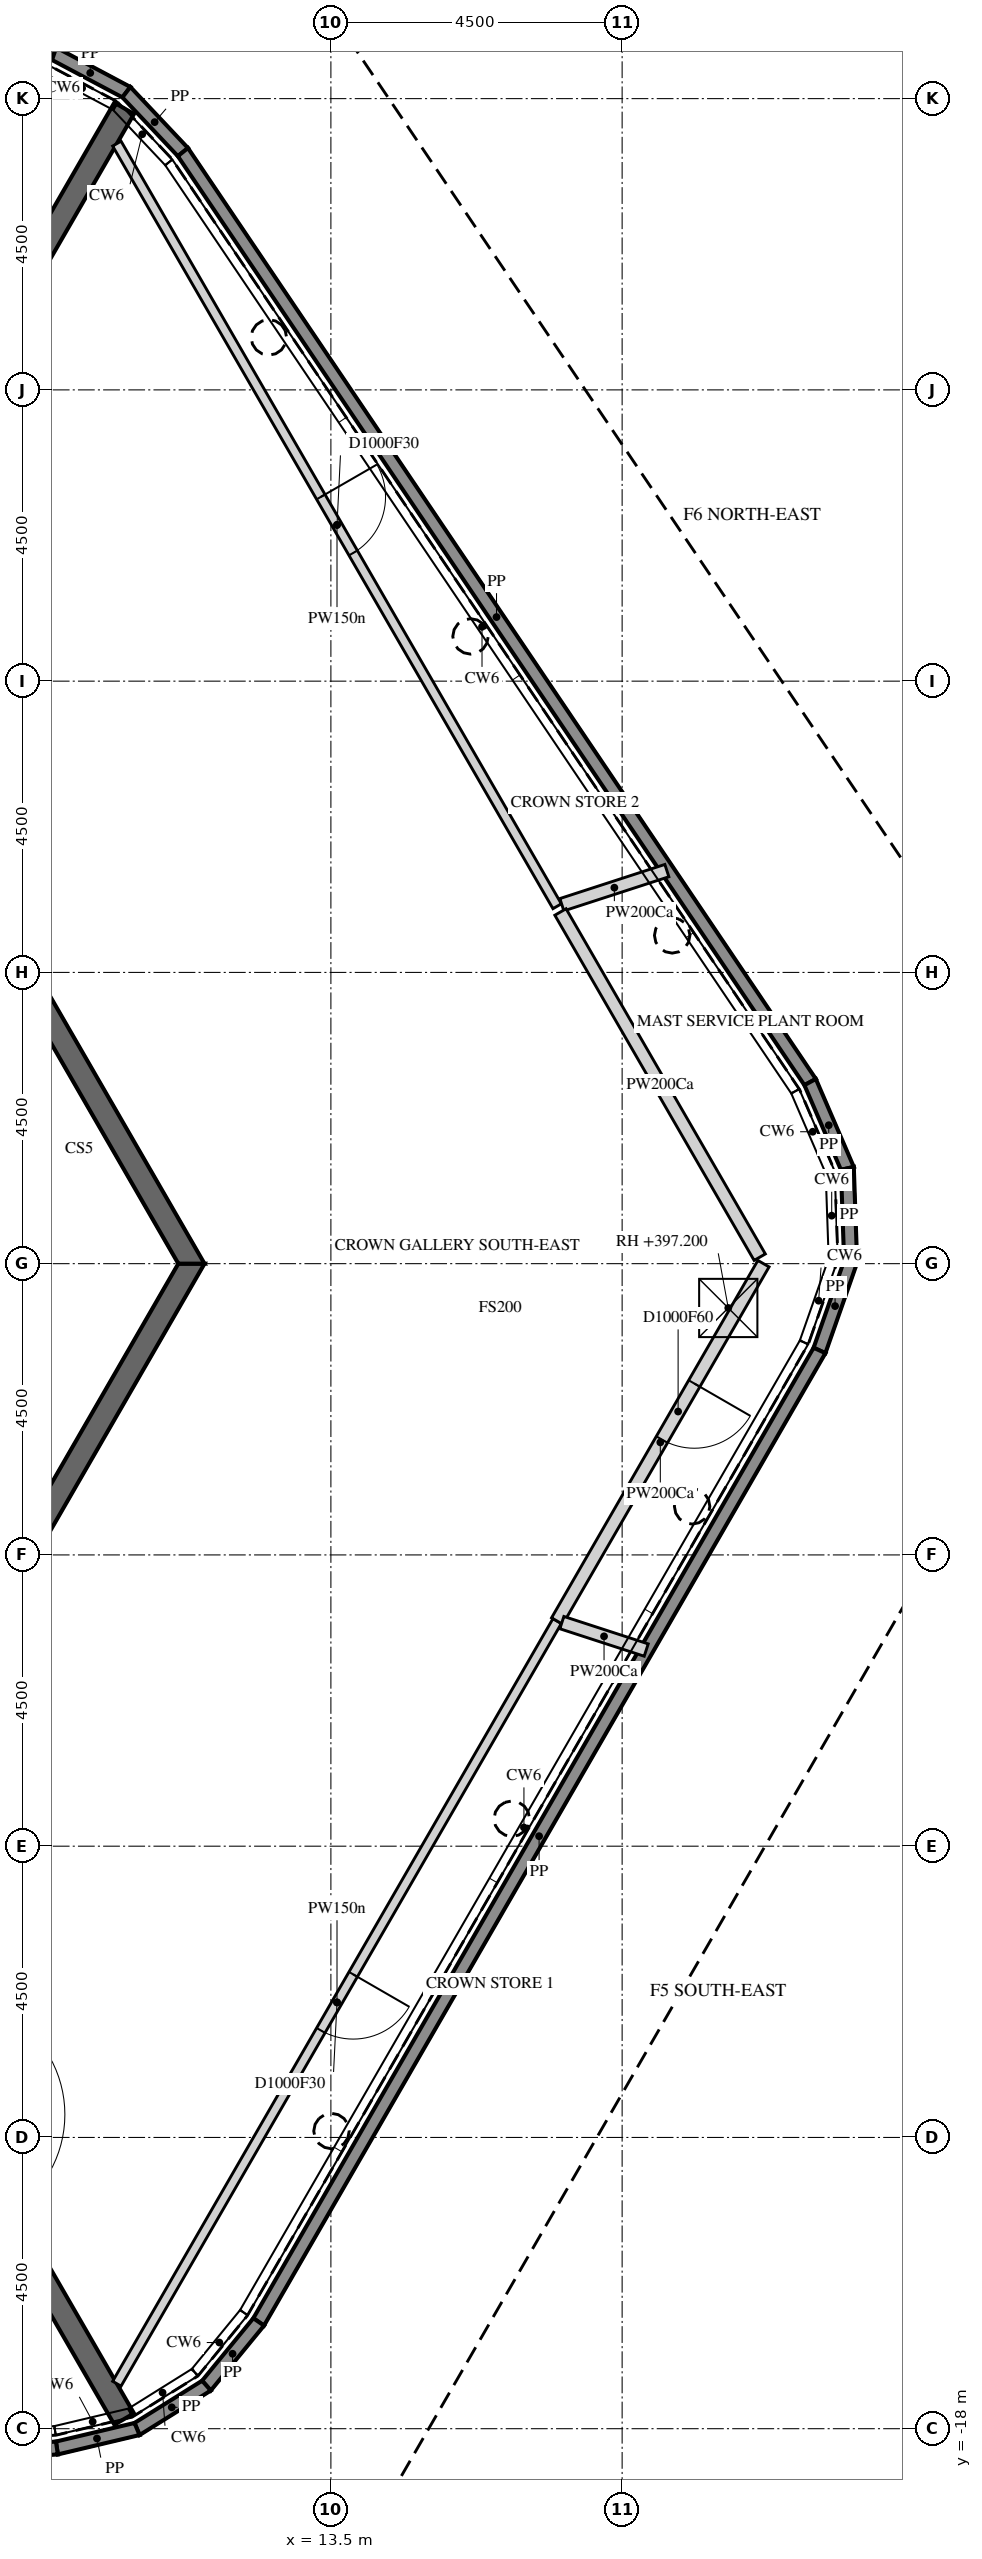
"""IFC4 building model, lengths in metres.
Left out: names, types, materials, properties, quantities, classifications, styles, units other than length and angle.
Written with IfcOpenShell. Run it as: python <this file> out.ifc"""

import sys

from ifc_helpers import new_model, si_unit, direction, frame, frame_2d, origin, origin_2d, place, context, subcontext, project, spatial, polyline, rectangle, outline, extrude, element, fill, save


model = new_model("IFC4")
c1 = context("Model", 3, precision=1e-05, world=origin(), true_north=direction((0.0, 1.0)))
c2 = subcontext(c1, "Body", "Model", "MODEL_VIEW")
j1 = project(units=[si_unit("LENGTHUNIT", "METRE"), si_unit("PLANEANGLEUNIT", "RADIAN")], contexts=[c1])
p1 = place(None, origin())
s1 = spatial("IfcSite", under=j1, at=p1, CompositionType="ELEMENT")
p2 = place(p1, origin())
s2 = spatial("IfcBuilding", under=s1, at=p2, CompositionType="ELEMENT")
p3 = place(p2, frame((0.0, 0.0, 392.7)))
s3 = spatial("IfcBuildingStorey", under=s2, at=p3, CompositionType="ELEMENT", Elevation=392.7)
p4 = place(p3, frame((7.968, 18.9, 4.5), z_axis=(0.0, 0.0, 1.0), x_axis=(0.9867748983, -0.162096576412, 0.0)))
e1 = element("IfcWall", 1, at=p4, inside=s3, PredefinedType="PARAPET", context=c2, shape_type="SweptSolid", body=[
    extrude(outline(polyline([(0.008, -0.1), (1.256, -0.1), (1.289, 0.1), (-0.008, 0.1), (0.008, -0.1)])), origin(), (0.0, 0.0, 1.0), 1.1),
])
p5 = place(p3, frame((9.223, 18.694, 4.5), z_axis=(0.0, 0.0, 1.0), x_axis=(0.882950708751, -0.469465702598, 0.0)))
e2 = element("IfcWall", 2, at=p5, inside=s3, PredefinedType="PARAPET", context=c2, shape_type="SweptSolid", body=[
    extrude(outline(polyline([(0.016, -0.1), (1.248, -0.1), (1.281, 0.1), (-0.016, 0.1), (0.016, -0.1)])), origin(), (0.0, 0.0, 1.0), 1.1),
])
p6 = place(p3, frame((10.34, 18.1, 4.5), z_axis=(0.0, 0.0, 1.0), x_axis=(0.686184039693, -0.727427978339, 0.0)))
e3 = element("IfcWall", 3, at=p6, inside=s3, PredefinedType="PARAPET", context=c2, shape_type="SweptSolid", body=[
    extrude(outline(polyline([(0.016, -0.1), (1.265, -0.1), (1.281, 0.1), (-0.016, 0.1), (0.016, -0.1)])), origin(), (0.0, 0.0, 1.0), 1.1),
])
p7 = place(p3, frame((11.213, 17.174, 4.5), z_axis=(0.0, 0.0, 1.0), x_axis=(0.559200888718, -0.829032186382, 0.0)))
e4 = element("IfcWall", 4, at=p7, inside=s3, PredefinedType="PARAPET", context=c2, shape_type="SweptSolid", body=[
    extrude(outline(polyline([(0.008, -0.1), (17.322, -0.1), (17.341, 0.1), (-0.008, 0.1), (0.008, -0.1)])), origin(), (0.0, 0.0, 1.0), 1.1),
])
p8 = place(p3, frame((20.905, 2.806, 4.5), z_axis=(0.0, 0.0, 1.0), x_axis=(0.396007748468, -0.918247168879, 0.0)))
e5 = element("IfcWall", 5, at=p8, inside=s3, PredefinedType="PARAPET", context=c2, shape_type="SweptSolid", body=[
    extrude(outline(polyline([(0.009, -0.1), (1.434, -0.1), (1.471, 0.1), (-0.009, 0.1), (0.009, -0.1)])), origin(), (0.0, 0.0, 1.0), 1.1),
])
p9 = place(p3, frame((21.48, 1.472, 4.5), z_axis=(0.0, 0.0, 1.0), x_axis=(0.034846799115, -0.999392665868, 0.0)))
e6 = element("IfcWall", 6, at=p9, inside=s3, PredefinedType="PARAPET", context=c2, shape_type="SweptSolid", body=[
    extrude(outline(polyline([(0.019, -0.1), (1.425, -0.1), (1.462, 0.1), (-0.019, 0.1), (0.019, -0.1)])), origin(), (0.0, 0.0, 1.0), 1.1),
])
p10 = place(p3, frame((21.531, 0.03, 4.5), z_axis=(0.0, 0.0, 1.0), x_axis=(-0.330964304762, -0.943643274216, 0.0)))
e7 = element("IfcWall", 7, at=p10, inside=s3, PredefinedType="PARAPET", context=c2, shape_type="SweptSolid", body=[
    extrude(outline(polyline([(0.019, -0.1), (1.443, -0.1), (1.462, 0.1), (-0.019, 0.1), (0.019, -0.1)])), origin(), (0.0, 0.0, 1.0), 1.1),
])
p11 = place(p3, frame((21.05, -1.341, 4.5), z_axis=(0.0, 0.0, 1.0), x_axis=(-0.500006974487, -0.866021377025, 0.0)))
e8 = element("IfcWall", 8, at=p11, inside=s3, PredefinedType="PARAPET", context=c2, shape_type="SweptSolid", body=[
    extrude(outline(polyline([(0.009, -0.1), (17.323, -0.1), (17.339, 0.1), (-0.009, 0.1), (0.009, -0.1)])), origin(), (0.0, 0.0, 1.0), 1.1),
])
p12 = place(p3, frame((12.384, -16.35, 4.5), z_axis=(0.0, 0.0, 1.0), x_axis=(-0.633822610937, -0.773478440466, 0.0)))
e9 = element("IfcWall", 9, at=p12, inside=s3, PredefinedType="PARAPET", context=c2, shape_type="SweptSolid", body=[
    extrude(outline(polyline([(0.008, -0.1), (1.256, -0.1), (1.289, 0.1), (-0.008, 0.1), (0.008, -0.1)])), origin(), (0.0, 0.0, 1.0), 1.1),
])
p13 = place(p3, frame((11.577, -17.334, 4.5), z_axis=(0.0, 0.0, 1.0), x_axis=(-0.848052526064, -0.529912174834, 0.0)))
e10 = element("IfcWall", 10, at=p13, inside=s3, PredefinedType="PARAPET", context=c2, shape_type="SweptSolid", body=[
    extrude(outline(polyline([(0.016, -0.1), (1.248, -0.1), (1.281, 0.1), (-0.016, 0.1), (0.016, -0.1)])), origin(), (0.0, 0.0, 1.0), 1.1),
])
p14 = place(p3, frame((10.505, -18.005, 4.5), z_axis=(0.0, 0.0, 1.0), x_axis=(-0.97305877523, -0.230557194525, 0.0)))
e11 = element("IfcWall", 11, at=p14, inside=s3, PredefinedType="PARAPET", context=c2, shape_type="SweptSolid", body=[
    extrude(outline(polyline([(0.016, -0.1), (1.265, -0.1), (1.281, 0.1), (-0.016, 0.1), (0.016, -0.1)])), origin(), (0.0, 0.0, 1.0), 1.1),
])
p15 = place(p3, frame((9.266, -18.298, 4.5), z_axis=(0.0, 0.0, 1.0), x_axis=(-0.997563920068, -0.069758335553, 0.0)))
e12 = element("IfcWall", 12, at=p15, inside=s3, PredefinedType="PARAPET", context=c2, shape_type="SweptSolid", body=[
    extrude(outline(polyline([(0.008, -0.1), (17.322, -0.1), (17.34, 0.1), (-0.008, 0.1), (0.008, -0.1)])), origin(), (0.0, 0.0, 1.0), 1.1),
])
p16 = place(p3, frame((5.673, -9.825, -0.2), z_axis=(0.0, 0.0, 1.0), x_axis=(0.499995046907, 0.866028263435, 0.0)))
e13 = element("IfcWall", 13, at=p16, inside=s3, PredefinedType="SHEAR", context=c2, shape_type="SweptSolid", body=[
    extrude(outline(polyline([(-0.101, -0.175), (11.446, -0.175), (11.244, 0.175), (0.101, 0.175), (-0.101, -0.175)])), origin(), (0.0, 0.0, 1.0), 4.5),
])
p17 = place(p16, frame((4.801, 0.0, 0.2)))
e14 = element("IfcOpeningElement", 14, at=p17, cuts=e13, PredefinedType="OPENING", context=c2, shape_type="SweptSolid", body=[
    extrude(rectangle(XDim=1.8, YDim=2.4, at=frame_2d((0.9, 1.2))), frame((0.0, 0.185, 0.0), z_axis=(0.0, -1.0, 0.0), x_axis=(1.0, 0.0, 0.0)), (0.0, 0.0, 1.0), 0.37),
])
p18 = place(p3, frame((11.345, 0.0, -0.2), z_axis=(0.0, 0.0, 1.0), x_axis=(-0.499995046907, 0.866028263435, 0.0)))
e15 = element("IfcWall", 15, at=p18, inside=s3, PredefinedType="SHEAR", context=c2, shape_type="SweptSolid", body=[
    extrude(outline(polyline([(-0.101, -0.175), (11.446, -0.175), (11.244, 0.175), (0.101, 0.175), (-0.101, -0.175)])), origin(), (0.0, 0.0, 1.0), 4.5),
])
p19 = place(p18, frame((4.744, 0.0, 0.2)))
e16 = element("IfcOpeningElement", 16, at=p19, cuts=e15, PredefinedType="OPENING", context=c2, shape_type="SweptSolid", body=[
    extrude(rectangle(XDim=1.8, YDim=2.4, at=frame_2d((0.9, 1.2))), frame((0.0, 0.185, 0.0), z_axis=(0.0, -1.0, 0.0), x_axis=(1.0, 0.0, 0.0)), (0.0, 0.0, 1.0), 0.37),
])
p20 = place(p3, frame((5.773, 10.0, -0.2), z_axis=(0.0, 0.0, 1.0), x_axis=(0.500006102154, 0.866021880676, 0.0)))
e17 = element("IfcWall", 17, at=p20, inside=s3, PredefinedType="SHEAR", context=c2, shape_type="SweptSolid", body=[
    extrude(rectangle(XDim=9.065, YDim=0.35, at=frame_2d((4.532, 0.0))), origin(), (0.0, 0.0, 1.0), 4.5),
])
p21 = place(p20, frame((3.632, 0.0, 0.2)))
e18 = element("IfcOpeningElement", 18, at=p21, cuts=e17, PredefinedType="OPENING", context=c2, shape_type="SweptSolid", body=[
    extrude(rectangle(XDim=1.8, YDim=2.4, at=frame_2d((0.9, 1.2))), frame((0.0, 0.185, 0.0), z_axis=(0.0, -1.0, 0.0), x_axis=(1.0, 0.0, 0.0)), (0.0, 0.0, 1.0), 0.37),
])
p22 = place(p3, frame((5.773, -10.0, -0.2), z_axis=(0.0, 0.0, 1.0), x_axis=(0.500006102154, -0.866021880676, 0.0)))
e19 = element("IfcWall", 19, at=p22, inside=s3, PredefinedType="SHEAR", context=c2, shape_type="SweptSolid", body=[
    extrude(rectangle(XDim=9.065, YDim=0.35, at=frame_2d((4.532, 0.0))), origin(), (0.0, 0.0, 1.0), 4.5),
])
p23 = place(p22, frame((3.632, 0.0, 0.2)))
e20 = element("IfcOpeningElement", 20, at=p23, cuts=e19, PredefinedType="OPENING", context=c2, shape_type="SweptSolid", body=[
    extrude(rectangle(XDim=1.8, YDim=2.4, at=frame_2d((0.9, 1.2))), frame((0.0, 0.185, 0.0), z_axis=(0.0, -1.0, 0.0), x_axis=(1.0, 0.0, 0.0)), (0.0, 0.0, 1.0), 0.37),
])
p24 = place(p3, frame((16.996, -5.522, 0.0), z_axis=(0.0, 0.0, 1.0), x_axis=(-0.500004628935, -0.866022731251, 0.0)))
e21 = element("IfcWall", 21, at=p24, inside=s3, PredefinedType="PARTITIONING", context=c2, shape_type="SweptSolid", body=[
    extrude(rectangle(XDim=13.606, YDim=0.15, at=frame_2d((6.803, 0.0))), origin(), (0.0, 0.0, 1.0), 4.3),
])
p25 = place(p24, frame((6.303, 0.0, 0.0)))
e22 = element("IfcOpeningElement", 22, at=p25, cuts=e21, PredefinedType="OPENING", context=c2, shape_type="SweptSolid", body=[
    extrude(rectangle(XDim=1.0, YDim=2.1, at=frame_2d((0.5, 1.05))), frame((0.0, 0.085, 0.0), z_axis=(0.0, -1.0, 0.0), x_axis=(1.0, 0.0, 0.0)), (0.0, 0.0, 1.0), 0.17),
])
p26 = place(p3, frame((20.184, 0.0, 0.0), z_axis=(0.0, 0.0, 1.0), x_axis=(-0.49998540044, -0.866033832681, 0.0)))
e23 = element("IfcWall", 23, at=p26, inside=s3, PredefinedType="PARTITIONING", context=c2, shape_type="SweptSolid", body=[
    extrude(rectangle(XDim=6.376, YDim=0.2, at=frame_2d((3.188, 0.0))), origin(), (0.0, 0.0, 1.0), 4.3),
])
p27 = place(p26, frame((2.138, 0.0, 0.0)))
e24 = element("IfcOpeningElement", 24, at=p27, cuts=e23, PredefinedType="OPENING", context=c2, shape_type="SweptSolid", body=[
    extrude(rectangle(XDim=1.0, YDim=2.1, at=frame_2d((0.5, 1.05))), frame((0.0, 0.11, 0.0), z_axis=(0.0, -1.0, 0.0), x_axis=(1.0, 0.0, 0.0)), (0.0, 0.0, 1.0), 0.22),
])
p28 = place(p3, frame((10.193, 17.305, 0.0), z_axis=(0.0, 0.0, 1.0), x_axis=(0.500004628935, -0.866022731251, 0.0)))
e25 = element("IfcWall", 25, at=p28, inside=s3, PredefinedType="PARTITIONING", context=c2, shape_type="SweptSolid", body=[
    extrude(rectangle(XDim=13.606, YDim=0.15, at=frame_2d((6.803, 0.0))), origin(), (0.0, 0.0, 1.0), 4.3),
])
p29 = place(p28, frame((6.303, 0.0, 0.0)))
e26 = element("IfcOpeningElement", 26, at=p29, cuts=e25, PredefinedType="OPENING", context=c2, shape_type="SweptSolid", body=[
    extrude(rectangle(XDim=1.0, YDim=2.1, at=frame_2d((0.5, 1.05))), frame((0.0, 0.085, 0.0), z_axis=(0.0, -1.0, 0.0), x_axis=(1.0, 0.0, 0.0)), (0.0, 0.0, 1.0), 0.17),
])
p30 = place(p3, frame((18.372, -5.97, 0.0), z_axis=(0.0, 0.0, 1.0), x_axis=(-0.950868992485, 0.30959353858, 0.0)))
e27 = element("IfcWall", 27, at=p30, inside=s3, PredefinedType="PARTITIONING", context=c2, shape_type="SweptSolid", body=[
    extrude(rectangle(XDim=1.371, YDim=0.2, at=frame_2d((0.685, 0.0))), origin(), (0.0, 0.0, 1.0), 4.3),
])
p31 = place(p3, frame((18.691, 6.073, 0.0), z_axis=(0.0, 0.0, 1.0), x_axis=(-0.951060360014, -0.309005164375, 0.0)))
e28 = element("IfcWall", 28, at=p31, inside=s3, PredefinedType="PARTITIONING", context=c2, shape_type="SweptSolid", body=[
    extrude(rectangle(XDim=1.706, YDim=0.2, at=frame_2d((0.853, 0.0))), origin(), (0.0, 0.0, 1.0), 4.3),
])
p32 = place(p3, frame((20.126, 0.1, 0.0), z_axis=(0.0, 0.0, 1.0), x_axis=(-0.499993558869, 0.866029122541, 0.0)))
e29 = element("IfcWall", 29, at=p32, inside=s3, PredefinedType="PARTITIONING", context=c2, shape_type="SweptSolid", body=[
    extrude(rectangle(XDim=6.158, YDim=0.2, at=frame_2d((3.079, 0.0))), origin(), (0.0, 0.0, 1.0), 4.3),
])
p33 = place(p2, frame((0.0, 0.0, 397.2)))
p34 = place(p33, frame((0.0, 0.0, -0.2)))
p35 = place(p34, frame((19.64, -0.685, 0.0)))
p36 = place(p35, frame((0.0, 0.0, 0.15)))
e30 = element("IfcDoor", 30, at=p36, inside=s3, OperationType="SINGLE_SWING_LEFT", PredefinedType="TRAPDOOR", context=c2, shape_type="SweptSolid", body=[
    extrude(rectangle(XDim=0.9, YDim=0.9, at=origin_2d()), origin(), (0.0, 0.0, 1.0), 0.05),
])
p37 = place(p25, origin())
e31 = element("IfcDoor", 31, at=p37, inside=s3, OperationType="SINGLE_SWING_LEFT", PredefinedType="DOOR", context=c2, shape_type="SweptSolid", body=[
    extrude(rectangle(XDim=1.0, YDim=2.1, at=frame_2d((0.5, 1.05))), frame((0.0, 0.025, 0.0), z_axis=(0.0, -1.0, 0.0), x_axis=(1.0, 0.0, 0.0)), (0.0, 0.0, 1.0), 0.05),
])
fill(e22, e31)
p38 = place(p27, origin())
e32 = element("IfcDoor", 32, at=p38, inside=s3, OperationType="SINGLE_SWING_RIGHT", PredefinedType="DOOR", context=c2, shape_type="SweptSolid", body=[
    extrude(rectangle(XDim=1.0, YDim=2.1, at=frame_2d((0.5, 1.05))), frame((0.0, 0.025, 0.0), z_axis=(0.0, -1.0, 0.0), x_axis=(1.0, 0.0, 0.0)), (0.0, 0.0, 1.0), 0.05),
])
fill(e24, e32)
p39 = place(p29, origin())
e33 = element("IfcDoor", 33, at=p39, inside=s3, OperationType="SINGLE_SWING_LEFT", PredefinedType="DOOR", context=c2, shape_type="SweptSolid", body=[
    extrude(rectangle(XDim=1.0, YDim=2.1, at=frame_2d((0.5, 1.05))), frame((0.0, 0.025, 0.0), z_axis=(0.0, -1.0, 0.0), x_axis=(1.0, 0.0, 0.0)), (0.0, 0.0, 1.0), 0.05),
])
fill(e26, e33)
save(model, sys.argv[1])
